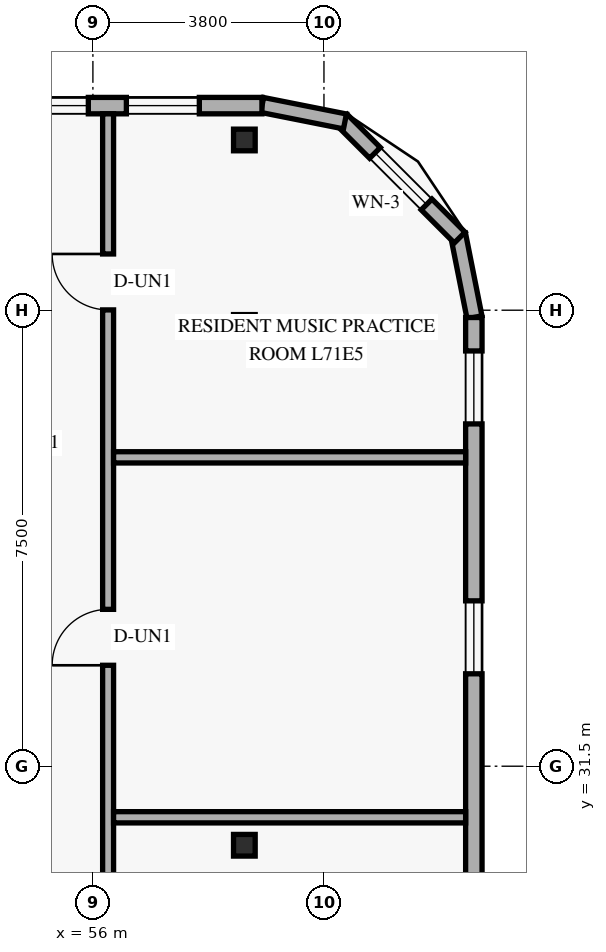
"""IFC4 building model, lengths in metres.
Left out: names, types, materials, properties, quantities, classifications, styles, units other than length and angle.
Written with IfcOpenShell. Run it as: python <this file> out.ifc"""

import sys

from ifc_helpers import new_model, si_unit, direction, frame, frame_2d, origin, origin_2d, place, context, subcontext, project, spatial, rectangle, hollow_rectangle, extrude, element, fill, save


model = new_model("IFC4")
c1 = context("Model", 3, precision=1e-05, world=origin(), true_north=direction((0.0, 1.0)))
c2 = subcontext(c1, "Body", "Model", "MODEL_VIEW")
j1 = project(units=[si_unit("LENGTHUNIT", "METRE"), si_unit("PLANEANGLEUNIT", "RADIAN")], contexts=[c1])
p1 = place(None, origin())
s1 = spatial("IfcSite", under=j1, at=p1, CompositionType="ELEMENT")
p2 = place(p1, origin())
s2 = spatial("IfcBuilding", under=s1, at=p2, CompositionType="ELEMENT")
p3 = place(p2, frame((0.0, 0.0, 271.2)))
s3 = spatial("IfcBuildingStorey", under=s2, at=p3, CompositionType="ELEMENT", Elevation=271.2)
for number, where, z_axis, x_axis in (
    (1, (58.386, 30.2, 0.0), (0.058, 0.0, 0.998), (0.0, 1.0, 0.0)),
    (2, (58.386, 38.75, 0.0), (0.058, 0.0, 0.998), (0.0, 1.0, 0.0)),
    (3, (58.386, 41.8, 0.0), (0.058, 0.0, 0.998), (0.0, 1.0, 0.0)),
):
    element("IfcColumn", number, at=place(p3, frame(where, z_axis=z_axis, x_axis=x_axis)), inside=s3, PredefinedType="COLUMN", context=c2, shape_type="SweptSolid", body=[
        extrude(hollow_rectangle(XDim=0.356, YDim=0.356, WallThickness=0.016, at=origin_2d()), origin(), (0.0, 0.0, 1.0), 3.606),
    ])
p4 = place(p3, frame((62.276, 38.884, 0.0), z_axis=(0.0, 0.0, 1.0), x_axis=(-0.195135625965, 0.9807762678, 0.0)))
e4 = element("IfcWall", 4, at=p4, inside=s3, PredefinedType="SOLIDWALL", context=c2, shape_type="SweptSolid", body=[
    extrude(rectangle(XDim=1.389, YDim=0.25, at=frame_2d((0.694, 0.0))), origin(), (0.0, 0.0, 1.0), 3.36),
])
p5 = place(p3, frame((62.032, 40.195, 0.0), z_axis=(0.0, 0.0, 1.0), x_axis=(-0.707106781187, 0.707106781187, 0.0)))
e5 = element("IfcWall", 5, at=p5, inside=s3, PredefinedType="SOLIDWALL", context=c2, shape_type="SweptSolid", body=[
    extrude(rectangle(XDim=2.739, YDim=0.25, at=frame_2d((1.37, 0.0))), origin(), (0.0, 0.0, 1.0), 3.36),
])
p6 = place(p5, frame((0.77, 0.0, 0.85)))
e6 = element("IfcOpeningElement", 6, at=p6, cuts=e5, PredefinedType="OPENING", context=c2, shape_type="SweptSolid", body=[
    extrude(rectangle(XDim=1.2, YDim=1.5, at=frame_2d((0.6, 0.75))), frame((0.0, 0.135, 0.0), z_axis=(0.0, -1.0, 0.0), x_axis=(1.0, 0.0, 0.0)), (0.0, 0.0, 1.0), 0.27),
])
p7 = place(p3, frame((60.146, 42.105, 0.0), z_axis=(0.0, 0.0, 1.0), x_axis=(-0.980809899341, 0.19496651342, 0.0)))
e7 = element("IfcWall", 7, at=p7, inside=s3, PredefinedType="SOLIDWALL", context=c2, shape_type="SweptSolid", body=[
    extrude(rectangle(XDim=1.389, YDim=0.25, at=frame_2d((0.694, 0.0))), origin(), (0.0, 0.0, 1.0), 3.36),
])
p8 = place(p3, frame((62.265, 9.12, 0.0), z_axis=(0.0, 0.0, 1.0), x_axis=(0.0, 1.0, 0.0)))
e8 = element("IfcWall", 8, at=p8, inside=s3, PredefinedType="SOLIDWALL", context=c2, shape_type="SweptSolid", body=[
    extrude(rectangle(XDim=29.76, YDim=0.27, at=frame_2d((14.88, 0.0))), origin(), (0.0, 0.0, 1.0), 3.36),
])
p9 = place(p8, frame((1.66, 0.0, 0.85)))
e9 = element("IfcOpeningElement", 9, at=p9, cuts=e8, PredefinedType="OPENING", context=c2, shape_type="SweptSolid", body=[
    extrude(rectangle(XDim=1.2, YDim=1.5, at=frame_2d((0.6, 0.75))), frame((0.0, 0.145, 0.0), z_axis=(0.0, -1.0, 0.0), x_axis=(1.0, 0.0, 0.0)), (0.0, 0.0, 1.0), 0.29),
])
p10 = place(p8, frame((8.175, 0.0, 0.85)))
e10 = element("IfcOpeningElement", 10, at=p10, cuts=e8, PredefinedType="OPENING", context=c2, shape_type="SweptSolid", body=[
    extrude(rectangle(XDim=1.2, YDim=1.5, at=frame_2d((0.6, 0.75))), frame((0.0, 0.145, 0.0), z_axis=(0.0, -1.0, 0.0), x_axis=(1.0, 0.0, 0.0)), (0.0, 0.0, 1.0), 0.29),
])
p11 = place(p8, frame((16.685, 0.0, 0.85)))
e11 = element("IfcOpeningElement", 11, at=p11, cuts=e8, PredefinedType="OPENING", context=c2, shape_type="SweptSolid", body=[
    extrude(rectangle(XDim=1.2, YDim=1.5, at=frame_2d((0.6, 0.75))), frame((0.0, 0.145, 0.0), z_axis=(0.0, -1.0, 0.0), x_axis=(1.0, 0.0, 0.0)), (0.0, 0.0, 1.0), 0.29),
])
p12 = place(p8, frame((23.9, 0.0, 0.85)))
e12 = element("IfcOpeningElement", 12, at=p12, cuts=e8, PredefinedType="OPENING", context=c2, shape_type="SweptSolid", body=[
    extrude(rectangle(XDim=1.2, YDim=1.5, at=frame_2d((0.6, 0.75))), frame((0.0, 0.145, 0.0), z_axis=(0.0, -1.0, 0.0), x_axis=(1.0, 0.0, 0.0)), (0.0, 0.0, 1.0), 0.29),
])
p13 = place(p8, frame((28.01, 0.0, 0.85)))
e13 = element("IfcOpeningElement", 13, at=p13, cuts=e8, PredefinedType="OPENING", context=c2, shape_type="SweptSolid", body=[
    extrude(rectangle(XDim=1.2, YDim=1.5, at=frame_2d((0.6, 0.75))), frame((0.0, 0.145, 0.0), z_axis=(0.0, -1.0, 0.0), x_axis=(1.0, 0.0, 0.0)), (0.0, 0.0, 1.0), 0.29),
])
p14 = place(p3, frame((58.78, 42.365, 0.0), z_axis=(0.0, 0.0, 1.0), x_axis=(-1.0, 0.0, 0.0)))
e14 = element("IfcWall", 14, at=p14, inside=s3, PredefinedType="SOLIDWALL", context=c2, shape_type="SweptSolid", body=[
    extrude(rectangle(XDim=32.96, YDim=0.27, at=frame_2d((16.48, 0.0))), origin(), (0.0, 0.0, 1.0), 3.36),
])
p15 = place(p14, frame((16.835, 0.0, 0.85)))
e15 = element("IfcOpeningElement", 15, at=p15, cuts=e14, PredefinedType="OPENING", context=c2, shape_type="SweptSolid", body=[
    extrude(rectangle(XDim=1.8, YDim=1.6, at=frame_2d((0.9, 0.8))), frame((0.0, 0.145, 0.0), z_axis=(0.0, -1.0, 0.0), x_axis=(1.0, 0.0, 0.0)), (0.0, 0.0, 1.0), 0.29),
])
p16 = place(p14, frame((5.715, 0.0, 0.85)))
e16 = element("IfcOpeningElement", 16, at=p16, cuts=e14, PredefinedType="OPENING", context=c2, shape_type="SweptSolid", body=[
    extrude(rectangle(XDim=1.8, YDim=1.6, at=frame_2d((0.9, 0.8))), frame((0.0, 0.145, 0.0), z_axis=(0.0, -1.0, 0.0), x_axis=(1.0, 0.0, 0.0)), (0.0, 0.0, 1.0), 0.29),
])
p17 = place(p14, frame((2.855, 0.0, 0.85)))
e17 = element("IfcOpeningElement", 17, at=p17, cuts=e14, PredefinedType="OPENING", context=c2, shape_type="SweptSolid", body=[
    extrude(rectangle(XDim=1.2, YDim=1.5, at=frame_2d((0.6, 0.75))), frame((0.0, 0.145, 0.0), z_axis=(0.0, -1.0, 0.0), x_axis=(1.0, 0.0, 0.0)), (0.0, 0.0, 1.0), 0.29),
])
p18 = place(p14, frame((1.03, 0.0, 0.85)))
e18 = element("IfcOpeningElement", 18, at=p18, cuts=e14, PredefinedType="OPENING", context=c2, shape_type="SweptSolid", body=[
    extrude(rectangle(XDim=1.2, YDim=1.5, at=frame_2d((0.6, 0.75))), frame((0.0, 0.145, 0.0), z_axis=(0.0, -1.0, 0.0), x_axis=(1.0, 0.0, 0.0)), (0.0, 0.0, 1.0), 0.29),
])
p19 = place(p3, frame((56.25, 5.77, 0.0), z_axis=(0.0, 0.0, 1.0), x_axis=(0.0, 1.0, 0.0)))
e19 = element("IfcWall", 19, at=p19, inside=s3, PredefinedType="STANDARD", context=c2, shape_type="SweptSolid", body=[
    extrude(rectangle(XDim=36.46, YDim=0.18, at=frame_2d((18.23, 0.0))), origin(), (0.0, 0.0, 1.0), 2.803),
])
p20 = place(p19, frame((1.93, 0.0, 0.0)))
e20 = element("IfcOpeningElement", 20, at=p20, cuts=e19, PredefinedType="OPENING", context=c2, shape_type="SweptSolid", body=[
    extrude(rectangle(XDim=0.92, YDim=2.15, at=frame_2d((0.46, 1.075))), frame((0.0, 0.1, 0.0), z_axis=(0.0, -1.0, 0.0), x_axis=(1.0, 0.0, 0.0)), (0.0, 0.0, 1.0), 0.2),
])
p21 = place(p19, frame((12.87, 0.0, 0.0)))
e21 = element("IfcOpeningElement", 21, at=p21, cuts=e19, PredefinedType="OPENING", context=c2, shape_type="SweptSolid", body=[
    extrude(rectangle(XDim=0.92, YDim=2.15, at=frame_2d((0.46, 1.075))), frame((0.0, 0.1, 0.0), z_axis=(0.0, -1.0, 0.0), x_axis=(1.0, 0.0, 0.0)), (0.0, 0.0, 1.0), 0.2),
])
p22 = place(p19, frame((21.38, 0.0, 0.0)))
e22 = element("IfcOpeningElement", 22, at=p22, cuts=e19, PredefinedType="OPENING", context=c2, shape_type="SweptSolid", body=[
    extrude(rectangle(XDim=0.92, YDim=2.15, at=frame_2d((0.46, 1.075))), frame((0.0, 0.1, 0.0), z_axis=(0.0, -1.0, 0.0), x_axis=(1.0, 0.0, 0.0)), (0.0, 0.0, 1.0), 0.2),
])
p23 = place(p19, frame((27.39, 0.0, 0.0)))
e23 = element("IfcOpeningElement", 23, at=p23, cuts=e19, PredefinedType="OPENING", context=c2, shape_type="SweptSolid", body=[
    extrude(rectangle(XDim=0.92, YDim=2.15, at=frame_2d((0.46, 1.075))), frame((0.0, 0.1, 0.0), z_axis=(0.0, -1.0, 0.0), x_axis=(1.0, 0.0, 0.0)), (0.0, 0.0, 1.0), 0.2),
])
p24 = place(p19, frame((33.235, 0.0, 0.0)))
e24 = element("IfcOpeningElement", 24, at=p24, cuts=e19, PredefinedType="OPENING", context=c2, shape_type="SweptSolid", body=[
    extrude(rectangle(XDim=0.92, YDim=2.15, at=frame_2d((0.46, 1.075))), frame((0.0, 0.1, 0.0), z_axis=(0.0, -1.0, 0.0), x_axis=(1.0, 0.0, 0.0)), (0.0, 0.0, 1.0), 0.2),
])
for number, where, z_axis, x_axis in (
    (25, (56.34, 30.66, 0.0), (0.0, 0.0, 1.0), (1.0, 0.0, 0.0)),
    (26, (56.34, 36.58, 0.0), (0.0, 0.0, 1.0), (1.0, 0.0, 0.0)),
):
    element("IfcWall", number, at=place(p3, frame(where, z_axis=z_axis, x_axis=x_axis)), inside=s3, PredefinedType="PARTITIONING", context=c2, shape_type="SweptSolid", body=[
        extrude(rectangle(XDim=5.79, YDim=0.185, at=frame_2d((2.895, 0.0))), origin(), (0.0, 0.0, 1.0), 2.879),
    ])
p25 = place(p6, origin())
e27 = element("IfcWindow", 27, at=p25, inside=s3, PartitioningType="SINGLE_PANEL", PredefinedType="WINDOW", context=c2, shape_type="SweptSolid", body=[
    extrude(rectangle(XDim=1.2, YDim=1.5, at=frame_2d((0.6, 0.75))), frame((0.0, 0.03, 0.0), z_axis=(0.0, -1.0, 0.0), x_axis=(1.0, 0.0, 0.0)), (0.0, 0.0, 1.0), 0.06),
])
fill(e6, e27)
p26 = place(p12, origin())
e28 = element("IfcWindow", 28, at=p26, inside=s3, PartitioningType="SINGLE_PANEL", PredefinedType="WINDOW", context=c2, shape_type="SweptSolid", body=[
    extrude(rectangle(XDim=1.2, YDim=1.5, at=frame_2d((0.6, 0.75))), frame((0.0, 0.03, 0.0), z_axis=(0.0, -1.0, 0.0), x_axis=(1.0, 0.0, 0.0)), (0.0, 0.0, 1.0), 0.06),
])
fill(e12, e28)
p27 = place(p13, origin())
e29 = element("IfcWindow", 29, at=p27, inside=s3, PartitioningType="SINGLE_PANEL", PredefinedType="WINDOW", context=c2, shape_type="SweptSolid", body=[
    extrude(rectangle(XDim=1.2, YDim=1.5, at=frame_2d((0.6, 0.75))), frame((0.0, 0.03, 0.0), z_axis=(0.0, -1.0, 0.0), x_axis=(1.0, 0.0, 0.0)), (0.0, 0.0, 1.0), 0.06),
])
fill(e13, e29)
p28 = place(p17, origin())
e30 = element("IfcWindow", 30, at=p28, inside=s3, PartitioningType="SINGLE_PANEL", PredefinedType="WINDOW", context=c2, shape_type="SweptSolid", body=[
    extrude(rectangle(XDim=1.2, YDim=1.5, at=frame_2d((0.6, 0.75))), frame((0.0, 0.03, 0.0), z_axis=(0.0, -1.0, 0.0), x_axis=(1.0, 0.0, 0.0)), (0.0, 0.0, 1.0), 0.06),
])
fill(e17, e30)
p29 = place(p18, origin())
e31 = element("IfcWindow", 31, at=p29, inside=s3, PartitioningType="SINGLE_PANEL", PredefinedType="WINDOW", context=c2, shape_type="SweptSolid", body=[
    extrude(rectangle(XDim=1.2, YDim=1.5, at=frame_2d((0.6, 0.75))), frame((0.0, 0.03, 0.0), z_axis=(0.0, -1.0, 0.0), x_axis=(1.0, 0.0, 0.0)), (0.0, 0.0, 1.0), 0.06),
])
fill(e18, e31)
p30 = place(p23, origin())
e32 = element("IfcDoor", 32, at=p30, inside=s3, OperationType="SINGLE_SWING_LEFT", PredefinedType="DOOR", context=c2, shape_type="SweptSolid", body=[
    extrude(rectangle(XDim=0.92, YDim=2.15, at=frame_2d((0.46, 1.075))), frame((0.0, 0.025, 0.0), z_axis=(0.0, -1.0, 0.0), x_axis=(1.0, 0.0, 0.0)), (0.0, 0.0, 1.0), 0.05),
])
fill(e23, e32)
p31 = place(p24, origin())
e33 = element("IfcDoor", 33, at=p31, inside=s3, OperationType="SINGLE_SWING_RIGHT", PredefinedType="DOOR", context=c2, shape_type="SweptSolid", body=[
    extrude(rectangle(XDim=0.92, YDim=2.15, at=frame_2d((0.46, 1.075))), frame((0.0, 0.025, 0.0), z_axis=(0.0, -1.0, 0.0), x_axis=(1.0, 0.0, 0.0)), (0.0, 0.0, 1.0), 0.05),
])
fill(e24, e33)
save(model, sys.argv[1])
